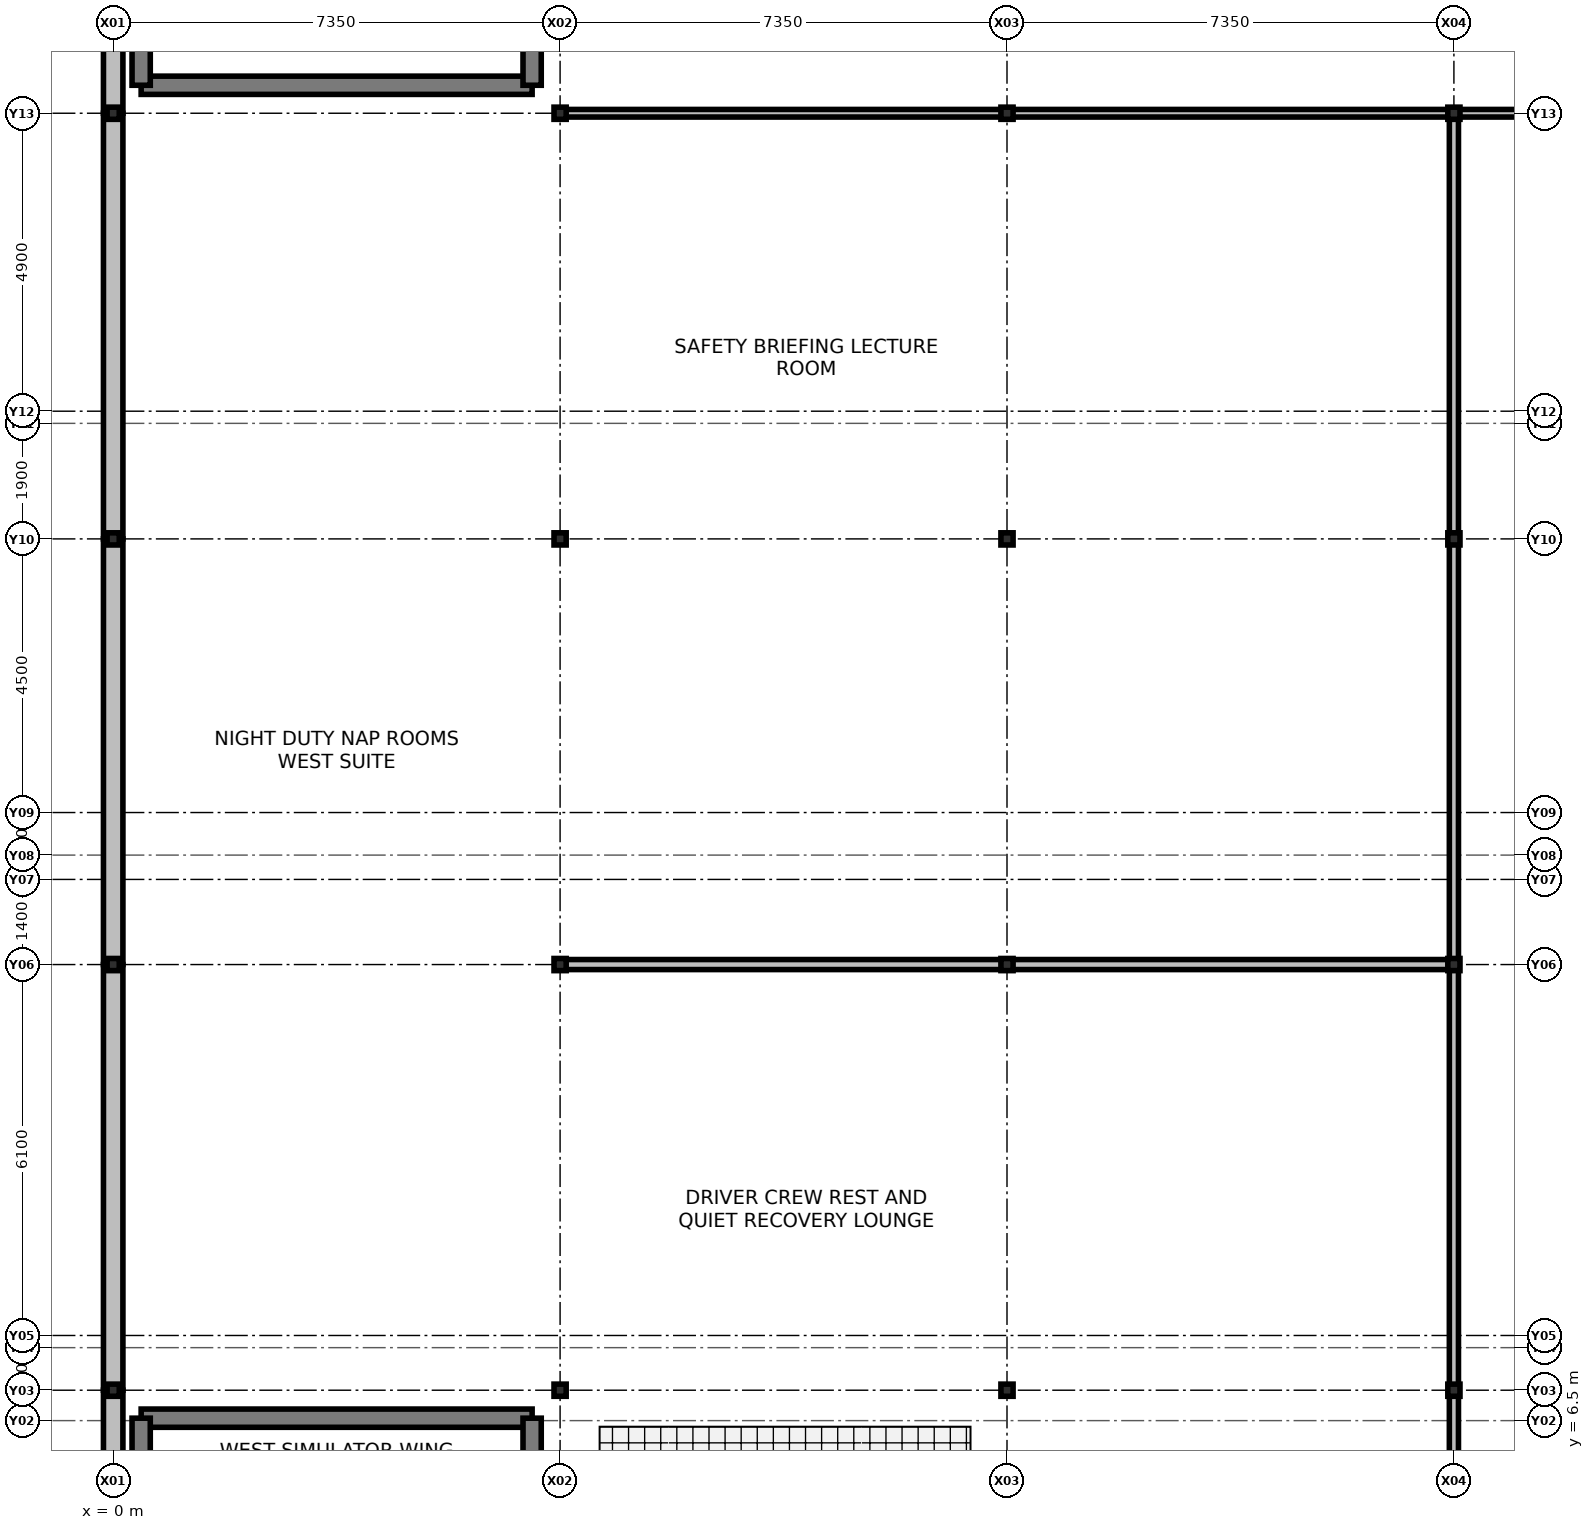
"""IFC4 building model, lengths in metres.
Left out: names, types, materials, properties, quantities, classifications, styles, units other than length and angle.
Written with IfcOpenShell. Run it as: python <this file> out.ifc"""

import sys

from ifc_helpers import new_model, si_unit, direction, frame, frame_2d, origin, origin_2d, place, context, subcontext, project, spatial, rectangle, i_section, extrude, element, fill, save


model = new_model("IFC4")
c1 = context("Model", 3, precision=1e-05, world=origin(), true_north=direction((0.0, 1.0)))
c2 = subcontext(c1, "Body", "Model", "MODEL_VIEW")
j1 = project(units=[si_unit("LENGTHUNIT", "METRE"), si_unit("PLANEANGLEUNIT", "RADIAN")], contexts=[c1])
p1 = place(None, origin())
s1 = spatial("IfcSite", under=j1, at=p1, CompositionType="ELEMENT")
p2 = place(p1, origin())
s2 = spatial("IfcBuilding", under=s1, at=p2, CompositionType="ELEMENT")
p3 = place(p2, frame((0.0, 0.0, 19.5)))
s3 = spatial("IfcBuildingStorey", under=s2, at=p3, CompositionType="ELEMENT", Elevation=19.5)
for number, where, z_axis, x_axis in (
    (1, (0.0, 7.0, 0.0), (0.0, 0.0, 1.0), (1.0, 0.0, 0.0)),
    (2, (0.0, 14.0, 0.0), (0.0, 0.0, 1.0), (1.0, 0.0, 0.0)),
    (3, (0.0, 21.0, 0.0), (0.0, 0.0, 1.0), (1.0, 0.0, 0.0)),
    (4, (0.0, 28.0, 0.0), (0.0, 0.0, 1.0), (1.0, 0.0, 0.0)),
    (5, (7.35, 7.0, 0.0), (0.0, 0.0, 1.0), (1.0, 0.0, 0.0)),
    (6, (7.35, 14.0, 0.0), (0.0, 0.0, 1.0), (1.0, 0.0, 0.0)),
    (7, (7.35, 21.0, 0.0), (0.0, 0.0, 1.0), (1.0, 0.0, 0.0)),
    (8, (7.35, 28.0, 0.0), (0.0, 0.0, 1.0), (1.0, 0.0, 0.0)),
    (9, (14.7, 7.0, 0.0), (0.0, 0.0, 1.0), (1.0, 0.0, 0.0)),
    (10, (14.7, 14.0, 0.0), (0.0, 0.0, 1.0), (1.0, 0.0, 0.0)),
    (11, (14.7, 21.0, 0.0), (0.0, 0.0, 1.0), (1.0, 0.0, 0.0)),
    (12, (14.7, 28.0, 0.0), (0.0, 0.0, 1.0), (1.0, 0.0, 0.0)),
    (13, (22.05, 7.0, 0.0), (0.0, 0.0, 1.0), (1.0, 0.0, 0.0)),
    (14, (22.05, 14.0, 0.0), (0.0, 0.0, 1.0), (1.0, 0.0, 0.0)),
    (15, (22.05, 21.0, 0.0), (0.0, 0.0, 1.0), (1.0, 0.0, 0.0)),
    (16, (22.05, 28.0, 0.0), (0.0, 0.0, 1.0), (1.0, 0.0, 0.0)),
):
    element("IfcColumn", number, at=place(p3, frame(where, z_axis=z_axis, x_axis=x_axis)), inside=s3, PredefinedType="COLUMN", context=c2, shape_type="SweptSolid", body=[
        extrude(i_section(OverallWidth=0.2, OverallDepth=0.2, WebThickness=0.008, FlangeThickness=0.012, at=origin_2d()), origin(), (0.0, 0.0, 1.0), 4.2),
    ])
p4 = place(p3, frame((0.0, 0.0, 0.0), z_axis=(0.0, 0.0, 1.0), x_axis=(0.0, 1.0, 0.0)))
e17 = element("IfcWall", 17, at=p4, inside=s3, PredefinedType="SOLIDWALL", context=c2, shape_type="SweptSolid", body=[
    extrude(rectangle(XDim=7.0, YDim=0.32, at=frame_2d((3.5, 0.0))), origin(), (0.0, 0.0, 1.0), 3.48),
])
p5 = place(p4, frame((2.2, 0.0, 0.9)))
e18 = element("IfcOpeningElement", 18, at=p5, cuts=e17, PredefinedType="OPENING", context=c2, shape_type="SweptSolid", body=[
    extrude(rectangle(XDim=2.55, YDim=1.75, at=frame_2d((1.275, 0.875))), frame((0.0, 0.17, 0.0), z_axis=(0.0, -1.0, 0.0), x_axis=(1.0, 0.0, 0.0)), (0.0, 0.0, 1.0), 0.34),
])
p6 = place(p3, frame((0.0, 7.0, 0.0), z_axis=(0.0, 0.0, 1.0), x_axis=(0.0, 1.0, 0.0)))
e19 = element("IfcWall", 19, at=p6, inside=s3, PredefinedType="SOLIDWALL", context=c2, shape_type="SweptSolid", body=[
    extrude(rectangle(XDim=7.0, YDim=0.32, at=frame_2d((3.5, 0.0))), origin(), (0.0, 0.0, 1.0), 3.48),
])
p7 = place(p6, frame((2.2, 0.0, 0.9)))
e20 = element("IfcOpeningElement", 20, at=p7, cuts=e19, PredefinedType="OPENING", context=c2, shape_type="SweptSolid", body=[
    extrude(rectangle(XDim=3.3, YDim=2.1, at=frame_2d((1.65, 1.05))), frame((0.0, 0.17, 0.0), z_axis=(0.0, -1.0, 0.0), x_axis=(1.0, 0.0, 0.0)), (0.0, 0.0, 1.0), 0.34),
])
p8 = place(p3, frame((0.0, 14.0, 0.0), z_axis=(0.0, 0.0, 1.0), x_axis=(0.0, 1.0, 0.0)))
e21 = element("IfcWall", 21, at=p8, inside=s3, PredefinedType="SOLIDWALL", context=c2, shape_type="SweptSolid", body=[
    extrude(rectangle(XDim=7.0, YDim=0.32, at=frame_2d((3.5, 0.0))), origin(), (0.0, 0.0, 1.0), 3.48),
])
p9 = place(p8, frame((2.2, 0.0, 0.9)))
e22 = element("IfcOpeningElement", 22, at=p9, cuts=e21, PredefinedType="OPENING", context=c2, shape_type="SweptSolid", body=[
    extrude(rectangle(XDim=1.5, YDim=1.8, at=frame_2d((0.75, 0.9))), frame((0.0, 0.17, 0.0), z_axis=(0.0, -1.0, 0.0), x_axis=(1.0, 0.0, 0.0)), (0.0, 0.0, 1.0), 0.34),
])
p10 = place(p3, frame((0.0, 21.0, 0.0), z_axis=(0.0, 0.0, 1.0), x_axis=(0.0, 1.0, 0.0)))
e23 = element("IfcWall", 23, at=p10, inside=s3, PredefinedType="SOLIDWALL", context=c2, shape_type="SweptSolid", body=[
    extrude(rectangle(XDim=7.0, YDim=0.32, at=frame_2d((3.5, 0.0))), origin(), (0.0, 0.0, 1.0), 3.48),
])
p11 = place(p10, frame((2.2, 0.0, 0.9)))
e24 = element("IfcOpeningElement", 24, at=p11, cuts=e23, PredefinedType="OPENING", context=c2, shape_type="SweptSolid", body=[
    extrude(rectangle(XDim=2.1, YDim=2.1, at=frame_2d((1.05, 1.05))), frame((0.0, 0.17, 0.0), z_axis=(0.0, -1.0, 0.0), x_axis=(1.0, 0.0, 0.0)), (0.0, 0.0, 1.0), 0.34),
])
p12 = place(p3, frame((0.0, 28.0, 0.0), z_axis=(0.0, 0.0, 1.0), x_axis=(0.0, 1.0, 0.0)))
e25 = element("IfcWall", 25, at=p12, inside=s3, PredefinedType="SOLIDWALL", context=c2, shape_type="SweptSolid", body=[
    extrude(rectangle(XDim=7.0, YDim=0.32, at=frame_2d((3.5, 0.0))), origin(), (0.0, 0.0, 1.0), 3.48),
])
p13 = place(p12, frame((2.2, 0.0, 0.9)))
e26 = element("IfcOpeningElement", 26, at=p13, cuts=e25, PredefinedType="OPENING", context=c2, shape_type="SweptSolid", body=[
    extrude(rectangle(XDim=3.0, YDim=1.8, at=frame_2d((1.5, 0.9))), frame((0.0, 0.17, 0.0), z_axis=(0.0, -1.0, 0.0), x_axis=(1.0, 0.0, 0.0)), (0.0, 0.0, 1.0), 0.34),
])
p14 = place(p3, frame((0.46, 28.46, 0.0), z_axis=(0.0, 0.0, 1.0), x_axis=(1.0, 0.0, 0.0)))
e27 = element("IfcWall", 27, at=p14, inside=s3, PredefinedType="SHEAR", context=c2, shape_type="SweptSolid", body=[
    extrude(rectangle(XDim=6.43, YDim=0.3, at=frame_2d((3.215, 0.0))), origin(), (0.0, 0.0, 1.0), 3.92),
])
for number, where, z_axis, x_axis in (
    (28, (0.46, 28.46, 0.0), (0.0, 0.0, 1.0), (0.0, 1.0, 0.0)),
    (29, (6.89, 28.46, 0.0), (0.0, 0.0, 1.0), (0.0, 1.0, 0.0)),
):
    element("IfcWall", number, at=place(p3, frame(where, z_axis=z_axis, x_axis=x_axis)), inside=s3, PredefinedType="SHEAR", context=c2, shape_type="SweptSolid", body=[
        extrude(rectangle(XDim=6.08, YDim=0.3, at=frame_2d((3.04, 0.0))), origin(), (0.0, 0.0, 1.0), 3.92),
    ])
p15 = place(p3, frame((0.46, 6.54, 0.0), z_axis=(0.0, 0.0, 1.0), x_axis=(1.0, 0.0, 0.0)))
e30 = element("IfcWall", 30, at=p15, inside=s3, PredefinedType="SHEAR", context=c2, shape_type="SweptSolid", body=[
    extrude(rectangle(XDim=6.43, YDim=0.3, at=frame_2d((3.215, 0.0))), origin(), (0.0, 0.0, 1.0), 3.92),
])
p16 = place(p15, frame((0.55, 0.0, 0.0)))
e31 = element("IfcOpeningElement", 31, at=p16, cuts=e30, PredefinedType="OPENING", context=c2, shape_type="SweptSolid", body=[
    extrude(rectangle(XDim=1.5, YDim=2.2, at=frame_2d((0.75, 1.1))), frame((0.0, 0.16, 0.0), z_axis=(0.0, -1.0, 0.0), x_axis=(1.0, 0.0, 0.0)), (0.0, 0.0, 1.0), 0.32),
])
for number, where, z_axis, x_axis in (
    (32, (0.46, 0.46, 0.0), (0.0, 0.0, 1.0), (0.0, 1.0, 0.0)),
    (33, (6.89, 0.46, 0.0), (0.0, 0.0, 1.0), (0.0, 1.0, 0.0)),
):
    element("IfcWall", number, at=place(p3, frame(where, z_axis=z_axis, x_axis=x_axis)), inside=s3, PredefinedType="SHEAR", context=c2, shape_type="SweptSolid", body=[
        extrude(rectangle(XDim=6.08, YDim=0.3, at=frame_2d((3.04, 0.0))), origin(), (0.0, 0.0, 1.0), 3.92),
    ])
p17 = place(p3, frame((7.35, 14.0, 0.0), z_axis=(0.0, 0.0, 1.0), x_axis=(1.0, 0.0, 0.0)))
e34 = element("IfcWall", 34, at=p17, inside=s3, PredefinedType="PARTITIONING", context=c2, shape_type="SweptSolid", body=[
    extrude(rectangle(XDim=14.7, YDim=0.165, at=frame_2d((7.35, 0.0))), origin(), (0.0, 0.0, 1.0), 3.25),
])
p18 = place(p17, frame((4.0, 0.0, 0.0)))
e35 = element("IfcOpeningElement", 35, at=p18, cuts=e34, PredefinedType="OPENING", context=c2, shape_type="SweptSolid", body=[
    extrude(rectangle(XDim=1.05, YDim=2.1, at=frame_2d((0.525, 1.05))), frame((0.0, 0.092, 0.0), z_axis=(0.0, -1.0, 0.0), x_axis=(1.0, 0.0, 0.0)), (0.0, 0.0, 1.0), 0.185),
])
p19 = place(p3, frame((22.05, 0.0, 0.0), z_axis=(0.0, 0.0, 1.0), x_axis=(0.0, 1.0, 0.0)))
e36 = element("IfcWall", 36, at=p19, inside=s3, PredefinedType="PARTITIONING", context=c2, shape_type="SweptSolid", body=[
    extrude(rectangle(XDim=28.0, YDim=0.15, at=frame_2d((14.0, 0.0))), origin(), (0.0, 0.0, 1.0), 3.25),
])
p20 = place(p19, frame((4.0, 0.0, 0.0)))
e37 = element("IfcOpeningElement", 37, at=p20, cuts=e36, PredefinedType="OPENING", context=c2, shape_type="SweptSolid", body=[
    extrude(rectangle(XDim=1.2, YDim=2.1, at=frame_2d((0.6, 1.05))), frame((0.0, 0.085, 0.0), z_axis=(0.0, -1.0, 0.0), x_axis=(1.0, 0.0, 0.0)), (0.0, 0.0, 1.0), 0.17),
])
p21 = place(p19, frame((24.0, 0.0, 0.0)))
e38 = element("IfcOpeningElement", 38, at=p21, cuts=e36, PredefinedType="OPENING", context=c2, shape_type="SweptSolid", body=[
    extrude(rectangle(XDim=1.1, YDim=2.1, at=frame_2d((0.55, 1.05))), frame((0.0, 0.085, 0.0), z_axis=(0.0, -1.0, 0.0), x_axis=(1.0, 0.0, 0.0)), (0.0, 0.0, 1.0), 0.17),
])
p22 = place(p3, frame((7.35, 28.0, 0.0), z_axis=(0.0, 0.0, 1.0), x_axis=(1.0, 0.0, 0.0)))
e39 = element("IfcWall", 39, at=p22, inside=s3, PredefinedType="PARTITIONING", context=c2, shape_type="SweptSolid", body=[
    extrude(rectangle(XDim=22.05, YDim=0.125, at=frame_2d((11.025, 0.0))), origin(), (0.0, 0.0, 1.0), 3.25),
])
p23 = place(p22, frame((4.0, 0.0, 0.0)))
e40 = element("IfcOpeningElement", 40, at=p23, cuts=e39, PredefinedType="OPENING", context=c2, shape_type="SweptSolid", body=[
    extrude(rectangle(XDim=1.35, YDim=2.2, at=frame_2d((0.675, 1.1))), frame((0.0, 0.072, 0.0), z_axis=(0.0, -1.0, 0.0), x_axis=(1.0, 0.0, 0.0)), (0.0, 0.0, 1.0), 0.145),
])
p24 = place(p22, frame((17.5, 0.0, 0.0)))
e41 = element("IfcOpeningElement", 41, at=p24, cuts=e39, PredefinedType="OPENING", context=c2, shape_type="SweptSolid", body=[
    extrude(rectangle(XDim=1.0, YDim=2.2, at=frame_2d((0.5, 1.1))), frame((0.0, 0.072, 0.0), z_axis=(0.0, -1.0, 0.0), x_axis=(1.0, 0.0, 0.0)), (0.0, 0.0, 1.0), 0.145),
])
p25 = place(p7, origin())
e42 = element("IfcWindow", 42, at=p25, inside=s3, PartitioningType="SINGLE_PANEL", PredefinedType="WINDOW", context=c2, shape_type="SweptSolid", body=[
    extrude(rectangle(XDim=3.3, YDim=2.1, at=frame_2d((1.65, 1.05))), frame((0.0, 0.03, 0.0), z_axis=(0.0, -1.0, 0.0), x_axis=(1.0, 0.0, 0.0)), (0.0, 0.0, 1.0), 0.06),
])
fill(e20, e42)
p26 = place(p9, origin())
e43 = element("IfcWindow", 43, at=p26, inside=s3, PartitioningType="SINGLE_PANEL", PredefinedType="WINDOW", context=c2, shape_type="SweptSolid", body=[
    extrude(rectangle(XDim=1.5, YDim=1.8, at=frame_2d((0.75, 0.9))), frame((0.0, 0.03, 0.0), z_axis=(0.0, -1.0, 0.0), x_axis=(1.0, 0.0, 0.0)), (0.0, 0.0, 1.0), 0.06),
])
fill(e22, e43)
p27 = place(p11, origin())
e44 = element("IfcWindow", 44, at=p27, inside=s3, PartitioningType="SINGLE_PANEL", PredefinedType="WINDOW", context=c2, shape_type="SweptSolid", body=[
    extrude(rectangle(XDim=2.1, YDim=2.1, at=frame_2d((1.05, 1.05))), frame((0.0, 0.03, 0.0), z_axis=(0.0, -1.0, 0.0), x_axis=(1.0, 0.0, 0.0)), (0.0, 0.0, 1.0), 0.06),
])
fill(e24, e44)
p28 = place(p16, origin())
e45 = element("IfcDoor", 45, at=p28, inside=s3, OperationType="DOUBLE_DOOR_SINGLE_SWING", PredefinedType="DOOR", context=c2, shape_type="SweptSolid", body=[
    extrude(rectangle(XDim=1.5, YDim=2.2, at=frame_2d((0.75, 1.1))), frame((0.0, 0.025, 0.0), z_axis=(0.0, -1.0, 0.0), x_axis=(1.0, 0.0, 0.0)), (0.0, 0.0, 1.0), 0.05),
])
fill(e31, e45)
p29 = place(p18, origin())
e46 = element("IfcDoor", 46, at=p29, inside=s3, OperationType="SINGLE_SWING_RIGHT", PredefinedType="DOOR", context=c2, shape_type="SweptSolid", body=[
    extrude(rectangle(XDim=1.05, YDim=2.1, at=frame_2d((0.525, 1.05))), frame((0.0, 0.025, 0.0), z_axis=(0.0, -1.0, 0.0), x_axis=(1.0, 0.0, 0.0)), (0.0, 0.0, 1.0), 0.05),
])
fill(e35, e46)
p30 = place(p21, origin())
e47 = element("IfcDoor", 47, at=p30, inside=s3, OperationType="SINGLE_SWING_RIGHT", PredefinedType="DOOR", context=c2, shape_type="SweptSolid", body=[
    extrude(rectangle(XDim=1.1, YDim=2.1, at=frame_2d((0.55, 1.05))), frame((0.0, 0.025, 0.0), z_axis=(0.0, -1.0, 0.0), x_axis=(1.0, 0.0, 0.0)), (0.0, 0.0, 1.0), 0.05),
])
fill(e38, e47)
p31 = place(p23, origin())
e48 = element("IfcDoor", 48, at=p31, inside=s3, OperationType="DOUBLE_DOOR_SINGLE_SWING", PredefinedType="DOOR", context=c2, shape_type="SweptSolid", body=[
    extrude(rectangle(XDim=1.35, YDim=2.2, at=frame_2d((0.675, 1.1))), frame((0.0, 0.025, 0.0), z_axis=(0.0, -1.0, 0.0), x_axis=(1.0, 0.0, 0.0)), (0.0, 0.0, 1.0), 0.05),
])
fill(e40, e48)
save(model, sys.argv[1])
